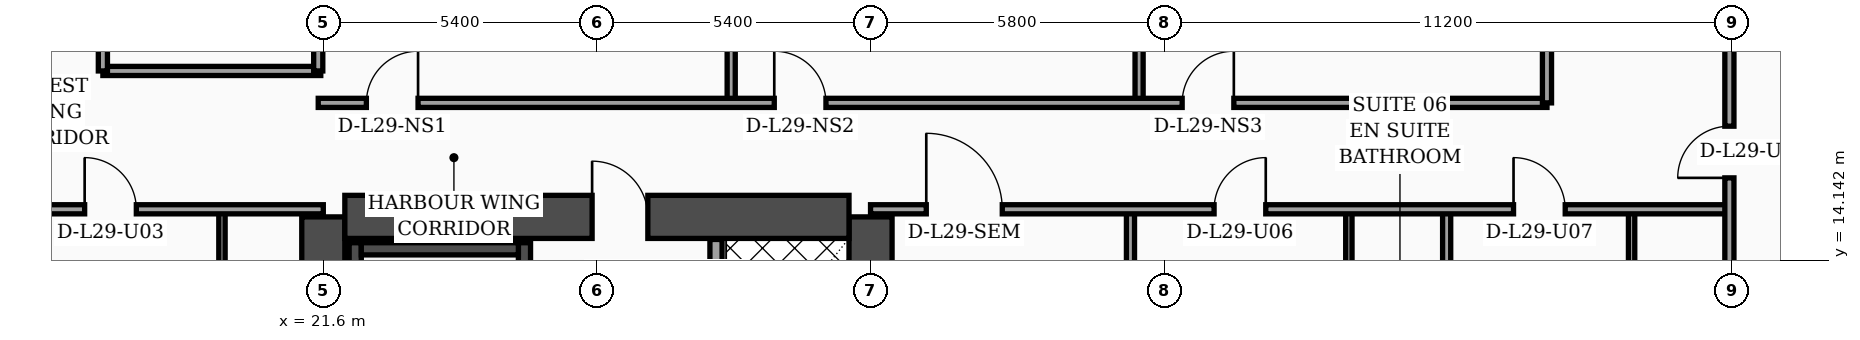
"""IFC4 building model, lengths in metres.
Left out: names, types, materials, properties, quantities, classifications, styles, units other than length and angle.
Written with IfcOpenShell. Run it as: python <this file> out.ifc"""

import sys

from ifc_helpers import new_model, si_unit, direction, frame, frame_2d, origin, place, context, subcontext, project, spatial, rectangle, extrude, element, fill, save


model = new_model("IFC4")
c1 = context("Model", 3, precision=1e-05, world=origin(), true_north=direction((0.0, 1.0)))
c2 = subcontext(c1, "Body", "Model", "MODEL_VIEW")
j1 = project(units=[si_unit("LENGTHUNIT", "METRE"), si_unit("PLANEANGLEUNIT", "RADIAN")], contexts=[c1])
p1 = place(None, origin())
s1 = spatial("IfcSite", under=j1, at=p1, CompositionType="ELEMENT")
p2 = place(p1, origin())
s2 = spatial("IfcBuilding", under=s1, at=p2, CompositionType="ELEMENT")
p3 = place(p2, frame((0.0, 0.0, 120.2)))
s3 = spatial("IfcBuildingStorey", under=s2, at=p3, CompositionType="ELEMENT", Elevation=120.2)
for number, where, z_axis, x_axis in (
    (1, (21.6, 4.6, 0.0), (0.0, 0.0, 1.0), (0.0, 1.0, 0.0)),
    (2, (32.4, 4.6, 0.0), (0.0, 0.0, 1.0), (0.0, 1.0, 0.0)),
):
    element("IfcWall", number, at=place(p3, frame(where, z_axis=z_axis, x_axis=x_axis)), inside=s3, PredefinedType="SHEAR", context=c2, shape_type="SweptSolid", body=[
        extrude(rectangle(XDim=10.4, YDim=0.85, at=frame_2d((5.2, 0.0))), origin(), (0.0, 0.0, 1.0), 3.56),
    ])
p4 = place(p3, frame((22.025, 15.0, 0.0), z_axis=(0.0, 0.0, 1.0), x_axis=(1.0, 0.0, 0.0)))
e3 = element("IfcWall", 3, at=p4, inside=s3, PredefinedType="SHEAR", context=c2, shape_type="SweptSolid", body=[
    extrude(rectangle(XDim=9.95, YDim=0.85, at=frame_2d((4.975, 0.0))), origin(), (0.0, 0.0, 1.0), 3.56),
])
p5 = place(p4, frame((4.88, 0.0, 0.0)))
e4 = element("IfcOpeningElement", 4, at=p5, cuts=e3, PredefinedType="OPENING", context=c2, shape_type="SweptSolid", body=[
    extrude(rectangle(XDim=1.1, YDim=2.2, at=frame_2d((0.55, 1.1))), frame((0.0, 0.435, 0.0), z_axis=(0.0, -1.0, 0.0), x_axis=(1.0, 0.0, 0.0)), (0.0, 0.0, 1.0), 0.87),
])
p6 = place(p3, frame((22.23, 5.025, 0.0), z_axis=(0.0, 0.0, 1.0), x_axis=(0.0, 1.0, 0.0)))
e5 = element("IfcWall", 5, at=p6, inside=s3, PredefinedType="SOLIDWALL", context=c2, shape_type="SweptSolid", body=[
    extrude(rectangle(XDim=9.465, YDim=0.24, at=frame_2d((4.732, 0.0))), origin(), (0.0, 0.0, 1.0), 3.56),
])
p7 = place(p3, frame((25.57, 5.025, 0.0), z_axis=(0.0, 0.0, 1.0), x_axis=(0.0, 1.0, 0.0)))
e6 = element("IfcWall", 6, at=p7, inside=s3, PredefinedType="SOLIDWALL", context=c2, shape_type="SweptSolid", body=[
    extrude(rectangle(XDim=9.465, YDim=0.24, at=frame_2d((4.732, 0.0))), origin(), (0.0, 0.0, 1.0), 3.56),
])
p8 = place(p7, frame((0.35, 0.0, 0.0)))
e7 = element("IfcOpeningElement", 7, at=p8, cuts=e6, PredefinedType="OPENING", context=c2, shape_type="SweptSolid", body=[
    extrude(rectangle(XDim=1.15, YDim=2.2, at=frame_2d((0.575, 1.1))), frame((0.0, 0.13, 0.0), z_axis=(0.0, -1.0, 0.0), x_axis=(1.0, 0.0, 0.0)), (0.0, 0.0, 1.0), 0.26),
])
p9 = place(p3, frame((22.35, 14.37, 0.0), z_axis=(0.0, 0.0, 1.0), x_axis=(1.0, 0.0, 0.0)))
e8 = element("IfcWall", 8, at=p9, inside=s3, PredefinedType="SOLIDWALL", context=c2, shape_type="SweptSolid", body=[
    extrude(rectangle(XDim=3.1, YDim=0.24, at=frame_2d((1.55, 0.0))), origin(), (0.0, 0.0, 1.0), 3.56),
])
p10 = place(p3, frame((59.23, 5.505, 0.0), z_axis=(0.0, 0.0, 1.0), x_axis=(-0.300509063924, 0.953778958931, 0.0)))
e9 = element("IfcWall", 9, at=p10, inside=s3, PredefinedType="SOLIDWALL", context=c2, shape_type="SweptSolid", body=[
    extrude(rectangle(XDim=30.814, YDim=0.32, at=frame_2d((15.407, 0.0))), origin(), (0.0, 0.0, 1.0), 3.56),
])
p11 = place(p10, frame((4.747, 0.0, 0.0)))
e10 = element("IfcOpeningElement", 10, at=p11, cuts=e9, PredefinedType="OPENING", context=c2, shape_type="SweptSolid", body=[
    extrude(rectangle(XDim=1.4, YDim=2.25, at=frame_2d((0.7, 1.125))), frame((0.0, 0.17, 0.0), z_axis=(0.0, -1.0, 0.0), x_axis=(1.0, 0.0, 0.0)), (0.0, 0.0, 1.0), 0.34),
])
p12 = place(p10, frame((2.65, 0.0, 0.75)))
e11 = element("IfcOpeningElement", 11, at=p12, cuts=e9, PredefinedType="OPENING", context=c2, shape_type="SweptSolid", body=[
    extrude(rectangle(XDim=1.5, YDim=1.6, at=frame_2d((0.75, 0.8))), frame((0.0, 0.17, 0.0), z_axis=(0.0, -1.0, 0.0), x_axis=(1.0, 0.0, 0.0)), (0.0, 0.0, 1.0), 0.34),
])
p13 = place(p10, frame((7.8, 0.0, 0.75)))
e12 = element("IfcOpeningElement", 12, at=p13, cuts=e9, PredefinedType="OPENING", context=c2, shape_type="SweptSolid", body=[
    extrude(rectangle(XDim=1.5, YDim=1.6, at=frame_2d((0.75, 0.8))), frame((0.0, 0.17, 0.0), z_axis=(0.0, -1.0, 0.0), x_axis=(1.0, 0.0, 0.0)), (0.0, 0.0, 1.0), 0.34),
])
p14 = place(p10, frame((10.9, 0.0, 0.75)))
e13 = element("IfcOpeningElement", 13, at=p14, cuts=e9, PredefinedType="OPENING", context=c2, shape_type="SweptSolid", body=[
    extrude(rectangle(XDim=1.5, YDim=1.6, at=frame_2d((0.75, 0.8))), frame((0.0, 0.17, 0.0), z_axis=(0.0, -1.0, 0.0), x_axis=(1.0, 0.0, 0.0)), (0.0, 0.0, 1.0), 0.34),
])
p15 = place(p10, frame((14.0, 0.0, 0.75)))
e14 = element("IfcOpeningElement", 14, at=p15, cuts=e9, PredefinedType="OPENING", context=c2, shape_type="SweptSolid", body=[
    extrude(rectangle(XDim=1.5, YDim=1.6, at=frame_2d((0.75, 0.8))), frame((0.0, 0.17, 0.0), z_axis=(0.0, -1.0, 0.0), x_axis=(1.0, 0.0, 0.0)), (0.0, 0.0, 1.0), 0.34),
])
p16 = place(p10, frame((17.1, 0.0, 0.75)))
e15 = element("IfcOpeningElement", 15, at=p16, cuts=e9, PredefinedType="OPENING", context=c2, shape_type="SweptSolid", body=[
    extrude(rectangle(XDim=1.5, YDim=1.6, at=frame_2d((0.75, 0.8))), frame((0.0, 0.17, 0.0), z_axis=(0.0, -1.0, 0.0), x_axis=(1.0, 0.0, 0.0)), (0.0, 0.0, 1.0), 0.34),
])
p17 = place(p10, frame((20.2, 0.0, 0.75)))
e16 = element("IfcOpeningElement", 16, at=p17, cuts=e9, PredefinedType="OPENING", context=c2, shape_type="SweptSolid", body=[
    extrude(rectangle(XDim=1.5, YDim=1.6, at=frame_2d((0.75, 0.8))), frame((0.0, 0.17, 0.0), z_axis=(0.0, -1.0, 0.0), x_axis=(1.0, 0.0, 0.0)), (0.0, 0.0, 1.0), 0.34),
])
p18 = place(p10, frame((23.3, 0.0, 0.75)))
e17 = element("IfcOpeningElement", 17, at=p18, cuts=e9, PredefinedType="OPENING", context=c2, shape_type="SweptSolid", body=[
    extrude(rectangle(XDim=1.5, YDim=1.6, at=frame_2d((0.75, 0.8))), frame((0.0, 0.17, 0.0), z_axis=(0.0, -1.0, 0.0), x_axis=(1.0, 0.0, 0.0)), (0.0, 0.0, 1.0), 0.34),
])
p19 = place(p10, frame((26.4, 0.0, 0.75)))
e18 = element("IfcOpeningElement", 18, at=p19, cuts=e9, PredefinedType="OPENING", context=c2, shape_type="SweptSolid", body=[
    extrude(rectangle(XDim=1.5, YDim=1.6, at=frame_2d((0.75, 0.8))), frame((0.0, 0.17, 0.0), z_axis=(0.0, -1.0, 0.0), x_axis=(1.0, 0.0, 0.0)), (0.0, 0.0, 1.0), 0.34),
])
p20 = place(p3, frame((29.35, 5.045, 0.0), z_axis=(0.0, 0.0, 1.0), x_axis=(0.0, 1.0, 0.0)))
e19 = element("IfcWall", 19, at=p20, inside=s3, PredefinedType="SOLIDWALL", context=c2, shape_type="SweptSolid", body=[
    extrude(rectangle(XDim=9.51, YDim=0.24, at=frame_2d((4.755, 0.0))), origin(), (0.0, 0.0, 1.0), 3.56),
])
p21 = place(p20, frame((0.55, 0.0, 0.0)))
e20 = element("IfcOpeningElement", 20, at=p21, cuts=e19, PredefinedType="OPENING", context=c2, shape_type="SweptSolid", body=[
    extrude(rectangle(XDim=1.3, YDim=2.35, at=frame_2d((0.65, 1.175))), frame((0.0, 0.13, 0.0), z_axis=(0.0, -1.0, 0.0), x_axis=(1.0, 0.0, 0.0)), (0.0, 0.0, 1.0), 0.26),
])
p22 = place(p3, frame((19.6, 2.44, 0.0), z_axis=(0.0, 0.0, 1.0), x_axis=(0.0, 1.0, 0.0)))
e21 = element("IfcWall", 21, at=p22, inside=s3, PredefinedType="PARTITIONING", context=c2, shape_type="SweptSolid", body=[
    extrude(rectangle(XDim=12.71, YDim=0.125, at=frame_2d((6.355, 0.0))), origin(), (0.0, 0.0, 1.0), 2.49),
])
p23 = place(p22, frame((4.34, 0.0, 0.0)))
e22 = element("IfcOpeningElement", 22, at=p23, cuts=e21, PredefinedType="OPENING", context=c2, shape_type="SweptSolid", body=[
    extrude(rectangle(XDim=0.96, YDim=2.2, at=frame_2d((0.48, 1.1))), frame((0.0, 0.073, 0.0), z_axis=(0.0, -1.0, 0.0), x_axis=(1.0, 0.0, 0.0)), (0.0, 0.0, 1.0), 0.145),
])
p24 = place(p22, frame((10.18, 0.0, 0.0)))
e23 = element("IfcOpeningElement", 23, at=p24, cuts=e21, PredefinedType="OPENING", context=c2, shape_type="SweptSolid", body=[
    extrude(rectangle(XDim=0.9, YDim=2.15, at=frame_2d((0.45, 1.075))), frame((0.0, 0.073, 0.0), z_axis=(0.0, -1.0, 0.0), x_axis=(1.0, 0.0, 0.0)), (0.0, 0.0, 1.0), 0.145),
])
p25 = place(p3, frame((15.15, 15.15, 0.0), z_axis=(0.0, 0.0, 1.0), x_axis=(1.0, 0.0, 0.0)))
e24 = element("IfcWall", 24, at=p25, inside=s3, PredefinedType="PARTITIONING", context=c2, shape_type="SweptSolid", body=[
    extrude(rectangle(XDim=6.45, YDim=0.18, at=frame_2d((3.225, 0.0))), origin(), (0.0, 0.0, 1.0), 2.49),
])
p26 = place(p25, frame((1.74, 0.0, 0.0)))
e25 = element("IfcOpeningElement", 25, at=p26, cuts=e24, PredefinedType="OPENING", context=c2, shape_type="SweptSolid", body=[
    extrude(rectangle(XDim=1.02, YDim=2.2, at=frame_2d((0.51, 1.1))), frame((0.0, 0.1, 0.0), z_axis=(0.0, -1.0, 0.0), x_axis=(1.0, 0.0, 0.0)), (0.0, 0.0, 1.0), 0.2),
])
p27 = place(p3, frame((17.25, 17.88, 0.0), z_axis=(0.0, 0.0, 1.0), x_axis=(1.0, 0.0, 0.0)))
e26 = element("IfcWall", 26, at=p27, inside=s3, PredefinedType="PARTITIONING", context=c2, shape_type="SweptSolid", body=[
    extrude(rectangle(XDim=4.3, YDim=0.18, at=frame_2d((2.15, 0.0))), origin(), (0.0, 0.0, 1.0), 3.56),
])
p28 = place(p3, frame((21.5, 17.88, 0.0), z_axis=(0.0, 0.0, 1.0), x_axis=(0.0, 1.0, 0.0)))
e27 = element("IfcWall", 27, at=p28, inside=s3, PredefinedType="PARTITIONING", context=c2, shape_type="SweptSolid", body=[
    extrude(rectangle(XDim=6.44, YDim=0.18, at=frame_2d((3.22, 0.0))), origin(), (0.0, 0.0, 1.0), 3.56),
])
p29 = place(p3, frame((17.25, 17.88, 0.0), z_axis=(0.0, 0.0, 1.0), x_axis=(0.0, 1.0, 0.0)))
e28 = element("IfcWall", 28, at=p29, inside=s3, PredefinedType="PARTITIONING", context=c2, shape_type="SweptSolid", body=[
    extrude(rectangle(XDim=6.44, YDim=0.18, at=frame_2d((3.22, 0.0))), origin(), (0.0, 0.0, 1.0), 3.56),
])
p30 = place(p29, frame((0.65, 0.0, 0.0)))
e29 = element("IfcOpeningElement", 29, at=p30, cuts=e28, PredefinedType="OPENING", context=c2, shape_type="SweptSolid", body=[
    extrude(rectangle(XDim=0.98, YDim=2.15, at=frame_2d((0.49, 1.075))), frame((0.0, 0.1, 0.0), z_axis=(0.0, -1.0, 0.0), x_axis=(1.0, 0.0, 0.0)), (0.0, 0.0, 1.0), 0.2),
])
p31 = place(p29, frame((3.27, 0.0, 0.0)))
e30 = element("IfcOpeningElement", 30, at=p31, cuts=e28, PredefinedType="OPENING", context=c2, shape_type="SweptSolid", body=[
    extrude(rectangle(XDim=0.96, YDim=2.2, at=frame_2d((0.48, 1.1))), frame((0.0, 0.1, 0.0), z_axis=(0.0, -1.0, 0.0), x_axis=(1.0, 0.0, 0.0)), (0.0, 0.0, 1.0), 0.2),
])
p32 = place(p3, frame((41.84, 2.44, 0.0), z_axis=(0.0, 0.0, 1.0), x_axis=(0.0, 1.0, 0.0)))
e31 = element("IfcWall", 31, at=p32, inside=s3, PredefinedType="PARTITIONING", context=c2, shape_type="SweptSolid", body=[
    extrude(rectangle(XDim=12.71, YDim=0.125, at=frame_2d((6.355, 0.0))), origin(), (0.0, 0.0, 1.0), 3.04),
])
p33 = place(p32, frame((4.35, 0.0, 0.0)))
e32 = element("IfcOpeningElement", 32, at=p33, cuts=e31, PredefinedType="OPENING", context=c2, shape_type="SweptSolid", body=[
    extrude(rectangle(XDim=0.96, YDim=2.2, at=frame_2d((0.48, 1.1))), frame((0.0, 0.073, 0.0), z_axis=(0.0, -1.0, 0.0), x_axis=(1.0, 0.0, 0.0)), (0.0, 0.0, 1.0), 0.145),
])
p34 = place(p32, frame((10.21, 0.0, 0.0)))
e33 = element("IfcOpeningElement", 33, at=p34, cuts=e31, PredefinedType="OPENING", context=c2, shape_type="SweptSolid", body=[
    extrude(rectangle(XDim=0.9, YDim=2.15, at=frame_2d((0.45, 1.075))), frame((0.0, 0.073, 0.0), z_axis=(0.0, -1.0, 0.0), x_axis=(1.0, 0.0, 0.0)), (0.0, 0.0, 1.0), 0.145),
])
p35 = place(p3, frame((37.53, 2.44, 0.0), z_axis=(0.0, 0.0, 1.0), x_axis=(0.0, 1.0, 0.0)))
e34 = element("IfcWall", 34, at=p35, inside=s3, PredefinedType="PARTITIONING", context=c2, shape_type="SweptSolid", body=[
    extrude(rectangle(XDim=12.71, YDim=0.16, at=frame_2d((6.355, 0.0))), origin(), (0.0, 0.0, 1.0), 2.84),
])
p36 = place(p3, frame((47.42, 2.44, 0.0), z_axis=(0.0, 0.0, 1.0), x_axis=(0.0, 1.0, 0.0)))
e35 = element("IfcWall", 35, at=p36, inside=s3, PredefinedType="PARTITIONING", context=c2, shape_type="SweptSolid", body=[
    extrude(rectangle(XDim=12.71, YDim=0.125, at=frame_2d((6.355, 0.0))), origin(), (0.0, 0.0, 1.0), 2.84),
])
p37 = place(p36, frame((4.35, 0.0, 0.0)))
e36 = element("IfcOpeningElement", 36, at=p37, cuts=e35, PredefinedType="OPENING", context=c2, shape_type="SweptSolid", body=[
    extrude(rectangle(XDim=0.96, YDim=2.2, at=frame_2d((0.48, 1.1))), frame((0.0, 0.073, 0.0), z_axis=(0.0, -1.0, 0.0), x_axis=(1.0, 0.0, 0.0)), (0.0, 0.0, 1.0), 0.145),
])
p38 = place(p36, frame((10.21, 0.0, 0.0)))
e37 = element("IfcOpeningElement", 37, at=p38, cuts=e35, PredefinedType="OPENING", context=c2, shape_type="SweptSolid", body=[
    extrude(rectangle(XDim=0.9, YDim=2.15, at=frame_2d((0.45, 1.075))), frame((0.0, 0.073, 0.0), z_axis=(0.0, -1.0, 0.0), x_axis=(1.0, 0.0, 0.0)), (0.0, 0.0, 1.0), 0.145),
])
p39 = place(p3, frame((43.77, 2.44, 0.0), z_axis=(0.0, 0.0, 1.0), x_axis=(0.0, 1.0, 0.0)))
e38 = element("IfcWall", 38, at=p39, inside=s3, PredefinedType="PARTITIONING", context=c2, shape_type="SweptSolid", body=[
    extrude(rectangle(XDim=12.71, YDim=0.16, at=frame_2d((6.355, 0.0))), origin(), (0.0, 0.0, 1.0), 3.04),
])
p40 = place(p3, frame((32.4, 15.15, 0.0), z_axis=(0.0, 0.0, 1.0), x_axis=(1.0, 0.0, 0.0)))
e39 = element("IfcWall", 39, at=p40, inside=s3, PredefinedType="PARTITIONING", context=c2, shape_type="SweptSolid", body=[
    extrude(rectangle(XDim=16.95, YDim=0.18, at=frame_2d((8.475, 0.0))), origin(), (0.0, 0.0, 1.0), 2.84),
])
p41 = place(p40, frame((1.1, 0.0, 0.0)))
e40 = element("IfcOpeningElement", 40, at=p41, cuts=e39, PredefinedType="OPENING", context=c2, shape_type="SweptSolid", body=[
    extrude(rectangle(XDim=1.5, YDim=2.22, at=frame_2d((0.75, 1.11))), frame((0.0, 0.1, 0.0), z_axis=(0.0, -1.0, 0.0), x_axis=(1.0, 0.0, 0.0)), (0.0, 0.0, 1.0), 0.2),
])
p42 = place(p40, frame((6.78, 0.0, 0.0)))
e41 = element("IfcOpeningElement", 41, at=p42, cuts=e39, PredefinedType="OPENING", context=c2, shape_type="SweptSolid", body=[
    extrude(rectangle(XDim=1.02, YDim=2.2, at=frame_2d((0.51, 1.1))), frame((0.0, 0.1, 0.0), z_axis=(0.0, -1.0, 0.0), x_axis=(1.0, 0.0, 0.0)), (0.0, 0.0, 1.0), 0.2),
])
p43 = place(p40, frame((12.69, 0.0, 0.0)))
e42 = element("IfcOpeningElement", 42, at=p43, cuts=e39, PredefinedType="OPENING", context=c2, shape_type="SweptSolid", body=[
    extrude(rectangle(XDim=1.02, YDim=2.2, at=frame_2d((0.51, 1.1))), frame((0.0, 0.1, 0.0), z_axis=(0.0, -1.0, 0.0), x_axis=(1.0, 0.0, 0.0)), (0.0, 0.0, 1.0), 0.2),
])
p44 = place(p3, frame((29.65, 17.25, 0.0), z_axis=(0.0, 0.0, 1.0), x_axis=(0.0, 1.0, 0.0)))
e43 = element("IfcWall", 43, at=p44, inside=s3, PredefinedType="PARTITIONING", context=c2, shape_type="SweptSolid", body=[
    extrude(rectangle(XDim=11.72, YDim=0.16, at=frame_2d((5.86, 0.0))), origin(), (0.0, 0.0, 1.0), 2.84),
])
p45 = place(p3, frame((37.7, 17.25, 0.0), z_axis=(0.0, 0.0, 1.0), x_axis=(0.0, 1.0, 0.0)))
e44 = element("IfcWall", 44, at=p45, inside=s3, PredefinedType="PARTITIONING", context=c2, shape_type="SweptSolid", body=[
    extrude(rectangle(XDim=16.2, YDim=0.16, at=frame_2d((8.1, 0.0))), origin(), (0.0, 0.0, 1.0), 2.84),
])
p46 = place(p3, frame((21.5, 17.25, 0.0), z_axis=(0.0, 0.0, 1.0), x_axis=(1.0, 0.0, 0.0)))
e45 = element("IfcWall", 45, at=p46, inside=s3, PredefinedType="PARTITIONING", context=c2, shape_type="SweptSolid", body=[
    extrude(rectangle(XDim=24.25, YDim=0.18, at=frame_2d((12.125, 0.0))), origin(), (0.0, 0.0, 1.0), 2.84),
])
p47 = place(p46, frame((0.95, 0.0, 0.0)))
e46 = element("IfcOpeningElement", 46, at=p47, cuts=e45, PredefinedType="OPENING", context=c2, shape_type="SweptSolid", body=[
    extrude(rectangle(XDim=1.02, YDim=2.2, at=frame_2d((0.51, 1.1))), frame((0.0, 0.1, 0.0), z_axis=(0.0, -1.0, 0.0), x_axis=(1.0, 0.0, 0.0)), (0.0, 0.0, 1.0), 0.2),
])
p48 = place(p46, frame((9.0, 0.0, 0.0)))
e47 = element("IfcOpeningElement", 47, at=p48, cuts=e45, PredefinedType="OPENING", context=c2, shape_type="SweptSolid", body=[
    extrude(rectangle(XDim=1.02, YDim=2.2, at=frame_2d((0.51, 1.1))), frame((0.0, 0.1, 0.0), z_axis=(0.0, -1.0, 0.0), x_axis=(1.0, 0.0, 0.0)), (0.0, 0.0, 1.0), 0.2),
])
p49 = place(p46, frame((17.05, 0.0, 0.0)))
e48 = element("IfcOpeningElement", 48, at=p49, cuts=e45, PredefinedType="OPENING", context=c2, shape_type="SweptSolid", body=[
    extrude(rectangle(XDim=1.02, YDim=2.2, at=frame_2d((0.51, 1.1))), frame((0.0, 0.1, 0.0), z_axis=(0.0, -1.0, 0.0), x_axis=(1.0, 0.0, 0.0)), (0.0, 0.0, 1.0), 0.2),
])
p50 = place(p3, frame((45.75, 17.25, 0.0), z_axis=(0.0, 0.0, 1.0), x_axis=(0.0, 1.0, 0.0)))
e49 = element("IfcWall", 49, at=p50, inside=s3, PredefinedType="PARTITIONING", context=c2, shape_type="SweptSolid", body=[
    extrude(rectangle(XDim=20.69, YDim=0.18, at=frame_2d((10.345, 0.0))), origin(), (0.0, 0.0, 1.0), 2.84),
])
p51 = place(p3, frame((49.35, 2.44, 0.0), z_axis=(0.0, 0.0, 1.0), x_axis=(0.0, 1.0, 0.0)))
e50 = element("IfcWall", 50, at=p51, inside=s3, PredefinedType="PARTITIONING", context=c2, shape_type="SweptSolid", body=[
    extrude(rectangle(XDim=18.36, YDim=0.18, at=frame_2d((9.18, 0.0))), origin(), (0.0, 0.0, 1.0), 2.84),
])
p52 = place(p51, frame((13.33, 0.0, 0.0)))
e51 = element("IfcOpeningElement", 51, at=p52, cuts=e50, PredefinedType="OPENING", context=c2, shape_type="SweptSolid", body=[
    extrude(rectangle(XDim=1.02, YDim=2.2, at=frame_2d((0.51, 1.1))), frame((0.0, 0.1, 0.0), z_axis=(0.0, -1.0, 0.0), x_axis=(1.0, 0.0, 0.0)), (0.0, 0.0, 1.0), 0.2),
])
p53 = place(p26, origin())
e52 = element("IfcDoor", 52, at=p53, inside=s3, OperationType="SINGLE_SWING_LEFT", PredefinedType="DOOR", context=c2, shape_type="SweptSolid", body=[
    extrude(rectangle(XDim=1.02, YDim=2.2, at=frame_2d((0.51, 1.1))), frame((0.0, 0.025, 0.0), z_axis=(0.0, -1.0, 0.0), x_axis=(1.0, 0.0, 0.0)), (0.0, 0.0, 1.0), 0.05),
])
fill(e25, e52)
p54 = place(p41, origin())
e53 = element("IfcDoor", 53, at=p54, inside=s3, OperationType="SINGLE_SWING_LEFT", PredefinedType="DOOR", context=c2, shape_type="SweptSolid", body=[
    extrude(rectangle(XDim=1.5, YDim=2.22, at=frame_2d((0.75, 1.11))), frame((0.0, 0.025, 0.0), z_axis=(0.0, -1.0, 0.0), x_axis=(1.0, 0.0, 0.0)), (0.0, 0.0, 1.0), 0.05),
])
fill(e40, e53)
p55 = place(p42, origin())
e54 = element("IfcDoor", 54, at=p55, inside=s3, OperationType="SINGLE_SWING_RIGHT", PredefinedType="DOOR", context=c2, shape_type="SweptSolid", body=[
    extrude(rectangle(XDim=1.02, YDim=2.2, at=frame_2d((0.51, 1.1))), frame((0.0, 0.025, 0.0), z_axis=(0.0, -1.0, 0.0), x_axis=(1.0, 0.0, 0.0)), (0.0, 0.0, 1.0), 0.05),
])
fill(e41, e54)
p56 = place(p43, origin())
e55 = element("IfcDoor", 55, at=p56, inside=s3, OperationType="SINGLE_SWING_LEFT", PredefinedType="DOOR", context=c2, shape_type="SweptSolid", body=[
    extrude(rectangle(XDim=1.02, YDim=2.2, at=frame_2d((0.51, 1.1))), frame((0.0, 0.025, 0.0), z_axis=(0.0, -1.0, 0.0), x_axis=(1.0, 0.0, 0.0)), (0.0, 0.0, 1.0), 0.05),
])
fill(e42, e55)
p57 = place(p47, origin())
e56 = element("IfcDoor", 56, at=p57, inside=s3, OperationType="SINGLE_SWING_RIGHT", PredefinedType="DOOR", context=c2, shape_type="SweptSolid", body=[
    extrude(rectangle(XDim=1.02, YDim=2.2, at=frame_2d((0.51, 1.1))), frame((0.0, 0.025, 0.0), z_axis=(0.0, -1.0, 0.0), x_axis=(1.0, 0.0, 0.0)), (0.0, 0.0, 1.0), 0.05),
])
fill(e46, e56)
p58 = place(p48, origin())
e57 = element("IfcDoor", 57, at=p58, inside=s3, OperationType="SINGLE_SWING_LEFT", PredefinedType="DOOR", context=c2, shape_type="SweptSolid", body=[
    extrude(rectangle(XDim=1.02, YDim=2.2, at=frame_2d((0.51, 1.1))), frame((0.0, 0.025, 0.0), z_axis=(0.0, -1.0, 0.0), x_axis=(1.0, 0.0, 0.0)), (0.0, 0.0, 1.0), 0.05),
])
fill(e47, e57)
p59 = place(p49, origin())
e58 = element("IfcDoor", 58, at=p59, inside=s3, OperationType="SINGLE_SWING_RIGHT", PredefinedType="DOOR", context=c2, shape_type="SweptSolid", body=[
    extrude(rectangle(XDim=1.02, YDim=2.2, at=frame_2d((0.51, 1.1))), frame((0.0, 0.025, 0.0), z_axis=(0.0, -1.0, 0.0), x_axis=(1.0, 0.0, 0.0)), (0.0, 0.0, 1.0), 0.05),
])
fill(e48, e58)
p60 = place(p52, origin())
e59 = element("IfcDoor", 59, at=p60, inside=s3, OperationType="SINGLE_SWING_LEFT", PredefinedType="DOOR", context=c2, shape_type="SweptSolid", body=[
    extrude(rectangle(XDim=1.02, YDim=2.2, at=frame_2d((0.51, 1.1))), frame((0.0, 0.025, 0.0), z_axis=(0.0, -1.0, 0.0), x_axis=(1.0, 0.0, 0.0)), (0.0, 0.0, 1.0), 0.05),
])
fill(e51, e59)
p61 = place(p5, origin())
e60 = element("IfcDoor", 60, at=p61, inside=s3, OperationType="SINGLE_SWING_LEFT", PredefinedType="DOOR", context=c2, shape_type="SweptSolid", body=[
    extrude(rectangle(XDim=1.1, YDim=2.2, at=frame_2d((0.55, 1.1))), frame((0.0, 0.025, 0.0), z_axis=(0.0, -1.0, 0.0), x_axis=(1.0, 0.0, 0.0)), (0.0, 0.0, 1.0), 0.05),
])
fill(e4, e60)
save(model, sys.argv[1])
